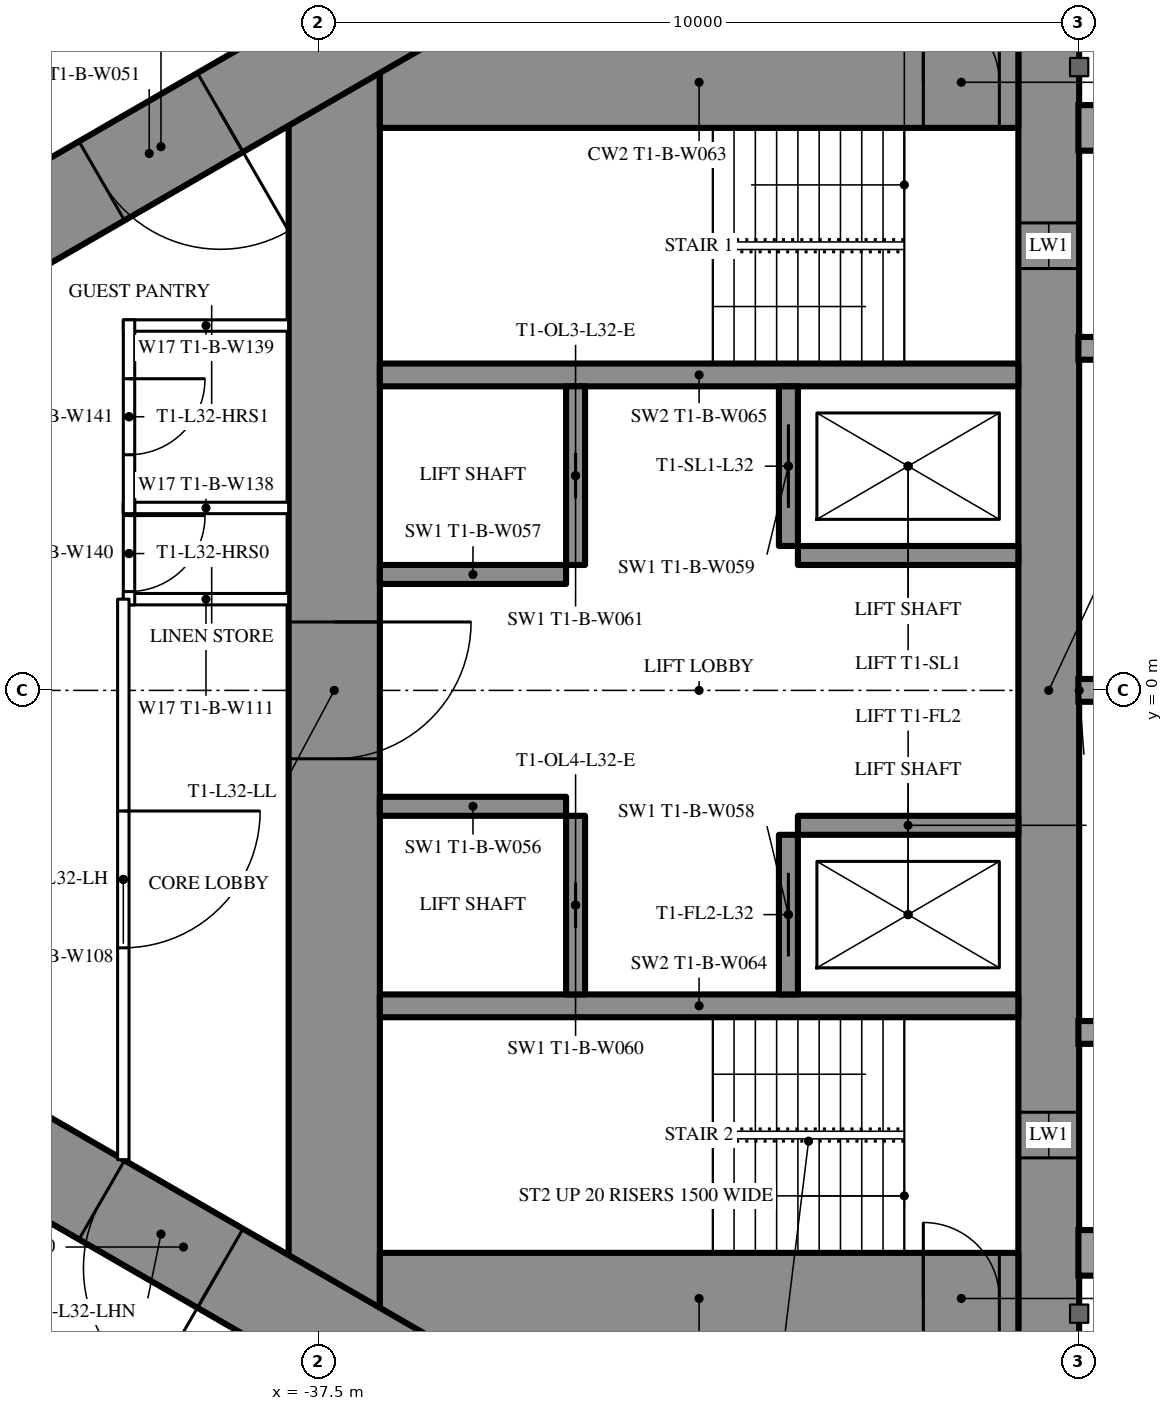
"""IFC4 building model, lengths in metres.
Left out: names, types, materials, properties, quantities, classifications, styles, units other than length and angle.
Written with IfcOpenShell. Run it as: python <this file> out.ifc"""

import sys

from ifc_helpers import new_model, si_unit, direction, frame, frame_2d, origin, place, context, subcontext, project, spatial, rectangle, extrude, element, fill, save


model = new_model("IFC4")
c1 = context("Model", 3, precision=1e-05, world=origin(), true_north=direction((0.0, 1.0)))
c2 = subcontext(c1, "Body", "Model", "MODEL_VIEW")
j1 = project(units=[si_unit("LENGTHUNIT", "METRE"), si_unit("PLANEANGLEUNIT", "RADIAN")], contexts=[c1])
p1 = place(None, origin())
s1 = spatial("IfcSite", under=j1, at=p1, CompositionType="ELEMENT")
p2 = place(p1, origin())
s2 = spatial("IfcBuilding", under=s1, at=p2, CompositionType="ELEMENT")
p3 = place(p2, frame((0.0, 0.0, 122.1)))
s3 = spatial("IfcBuildingStorey", under=s2, at=p3, CompositionType="ELEMENT", Elevation=122.1)
p4 = place(p3, frame((-27.9, 8.6, 0.0), z_axis=(0.0, 0.0, 1.0), x_axis=(0.0, -1.0, 0.0)))
e1 = element("IfcWall", 1, at=p4, inside=s3, PredefinedType="SHEAR", context=c2, shape_type="SweptSolid", body=[
    extrude(rectangle(XDim=17.2, YDim=0.8, at=frame_2d((8.6, 0.0))), origin(), (0.0, 0.0, 1.0), 3.5),
])
p5 = place(p4, frame((2.45, 0.0, 0.6)))
e2 = element("IfcOpeningElement", 2, at=p5, cuts=e1, PredefinedType="OPENING", context=c2, shape_type="SweptSolid", body=[
    extrude(rectangle(XDim=0.6, YDim=2.1, at=frame_2d((0.3, 1.05))), frame((0.0, 0.41, 0.0), z_axis=(0.0, -1.0, 0.0), x_axis=(1.0, 0.0, 0.0)), (0.0, 0.0, 1.0), 0.82),
])
p6 = place(p4, frame((14.15, 0.0, 0.6)))
e3 = element("IfcOpeningElement", 3, at=p6, cuts=e1, PredefinedType="OPENING", context=c2, shape_type="SweptSolid", body=[
    extrude(rectangle(XDim=0.6, YDim=2.1, at=frame_2d((0.3, 1.05))), frame((0.0, 0.41, 0.0), z_axis=(0.0, -1.0, 0.0), x_axis=(1.0, 0.0, 0.0)), (0.0, 0.0, 1.0), 0.82),
])
p7 = place(p3, frame((-37.3, 8.6, 0.0), z_axis=(0.0, 0.0, 1.0), x_axis=(0.0, -1.0, 0.0)))
e4 = element("IfcWall", 4, at=p7, inside=s3, PredefinedType="SHEAR", context=c2, shape_type="SweptSolid", body=[
    extrude(rectangle(XDim=17.2, YDim=1.2, at=frame_2d((8.6, 0.0))), origin(), (0.0, 0.0, 1.0), 3.5),
])
p8 = place(p7, frame((7.7, 0.0, 0.0)))
e5 = element("IfcOpeningElement", 5, at=p8, cuts=e4, PredefinedType="OPENING", context=c2, shape_type="SweptSolid", body=[
    extrude(rectangle(XDim=1.8, YDim=2.2, at=frame_2d((0.9, 1.1))), frame((0.0, 0.61, 0.0), z_axis=(0.0, -1.0, 0.0), x_axis=(1.0, 0.0, 0.0)), (0.0, 0.0, 1.0), 1.22),
])
p9 = place(p3, frame((-28.3, 8.0, 0.0), z_axis=(0.0, 0.0, 1.0), x_axis=(-1.0, 0.0, 0.0)))
e6 = element("IfcWall", 6, at=p9, inside=s3, PredefinedType="SHEAR", context=c2, shape_type="SweptSolid", body=[
    extrude(rectangle(XDim=8.4, YDim=1.2, at=frame_2d((4.2, 0.0))), origin(), (0.0, 0.0, 1.0), 3.5),
])
p10 = place(p9, frame((0.25, 0.0, 0.0)))
e7 = element("IfcOpeningElement", 7, at=p10, cuts=e6, PredefinedType="OPENING", context=c2, shape_type="SweptSolid", body=[
    extrude(rectangle(XDim=1.0, YDim=2.2, at=frame_2d((0.5, 1.1))), frame((0.0, 0.61, 0.0), z_axis=(0.0, -1.0, 0.0), x_axis=(1.0, 0.0, 0.0)), (0.0, 0.0, 1.0), 1.22),
])
p11 = place(p3, frame((-28.3, -8.0, 0.0), z_axis=(0.0, 0.0, 1.0), x_axis=(-1.0, 0.0, 0.0)))
e8 = element("IfcWall", 8, at=p11, inside=s3, PredefinedType="SHEAR", context=c2, shape_type="SweptSolid", body=[
    extrude(rectangle(XDim=8.4, YDim=1.2, at=frame_2d((4.2, 0.0))), origin(), (0.0, 0.0, 1.0), 3.5),
])
p12 = place(p11, frame((0.25, 0.0, 0.0)))
e9 = element("IfcOpeningElement", 9, at=p12, cuts=e8, PredefinedType="OPENING", context=c2, shape_type="SweptSolid", body=[
    extrude(rectangle(XDim=1.0, YDim=2.2, at=frame_2d((0.5, 1.1))), frame((0.0, 0.61, 0.0), z_axis=(0.0, -1.0, 0.0), x_axis=(1.0, 0.0, 0.0)), (0.0, 0.0, 1.0), 1.22),
])
for number, where, z_axis, x_axis in (
    (10, (-28.3, 4.15, 0.0), (0.0, 0.0, 1.0), (-1.0, 0.0, 0.0)),
    (11, (-28.3, -4.15, 0.0), (0.0, 0.0, 1.0), (-1.0, 0.0, 0.0)),
):
    element("IfcWall", number, at=place(p3, frame(where, z_axis=z_axis, x_axis=x_axis)), inside=s3, PredefinedType="SHEAR", context=c2, shape_type="SweptSolid", body=[
        extrude(rectangle(XDim=8.4, YDim=0.3, at=frame_2d((4.2, 0.0))), origin(), (0.0, 0.0, 1.0), 3.5),
    ])
p13 = place(p3, frame((-31.325, 4.0, 0.0), z_axis=(0.0, 0.0, 1.0), x_axis=(0.0, -1.0, 0.0)))
e12 = element("IfcWall", 12, at=p13, inside=s3, PredefinedType="SHEAR", context=c2, shape_type="SweptSolid", body=[
    extrude(rectangle(XDim=2.1, YDim=0.25, at=frame_2d((1.05, 0.0))), origin(), (0.0, 0.0, 1.0), 3.5),
])
p14 = place(p13, frame((0.5, 0.0, 0.0)))
e13 = element("IfcOpeningElement", 13, at=p14, cuts=e12, PredefinedType="OPENING", context=c2, shape_type="SweptSolid", body=[
    extrude(rectangle(XDim=1.1, YDim=2.2, at=frame_2d((0.55, 1.1))), frame((0.0, 0.135, 0.0), z_axis=(0.0, -1.0, 0.0), x_axis=(1.0, 0.0, 0.0)), (0.0, 0.0, 1.0), 0.27),
])
p15 = place(p3, frame((-34.125, 4.0, 0.0), z_axis=(0.0, 0.0, 1.0), x_axis=(0.0, -1.0, 0.0)))
e14 = element("IfcWall", 14, at=p15, inside=s3, PredefinedType="SHEAR", context=c2, shape_type="SweptSolid", body=[
    extrude(rectangle(XDim=2.35, YDim=0.25, at=frame_2d((1.175, 0.0))), origin(), (0.0, 0.0, 1.0), 3.5),
])
p16 = place(p15, frame((0.875, 0.0, 0.0)))
e15 = element("IfcOpeningElement", 15, at=p16, cuts=e14, PredefinedType="OPENING", context=c2, shape_type="SweptSolid", body=[
    extrude(rectangle(XDim=0.6, YDim=2.0, at=frame_2d((0.3, 1.0))), frame((0.0, 0.135, 0.0), z_axis=(0.0, -1.0, 0.0), x_axis=(1.0, 0.0, 0.0)), (0.0, 0.0, 1.0), 0.27),
])
p17 = place(p3, frame((-28.3, 1.775, 0.0), z_axis=(0.0, 0.0, 1.0), x_axis=(-1.0, 0.0, 0.0)))
e16 = element("IfcWall", 16, at=p17, inside=s3, PredefinedType="SHEAR", context=c2, shape_type="SweptSolid", body=[
    extrude(rectangle(XDim=2.9, YDim=0.25, at=frame_2d((1.45, 0.0))), origin(), (0.0, 0.0, 1.0), 3.5),
])
p18 = place(p3, frame((-34.25, 1.525, 0.0), z_axis=(0.0, 0.0, 1.0), x_axis=(-1.0, 0.0, 0.0)))
e17 = element("IfcWall", 17, at=p18, inside=s3, PredefinedType="SHEAR", context=c2, shape_type="SweptSolid", body=[
    extrude(rectangle(XDim=2.45, YDim=0.25, at=frame_2d((1.225, 0.0))), origin(), (0.0, 0.0, 1.0), 3.5),
])
p19 = place(p3, frame((-31.325, -1.9, 0.0), z_axis=(0.0, 0.0, 1.0), x_axis=(0.0, -1.0, 0.0)))
e18 = element("IfcWall", 18, at=p19, inside=s3, PredefinedType="SHEAR", context=c2, shape_type="SweptSolid", body=[
    extrude(rectangle(XDim=2.1, YDim=0.25, at=frame_2d((1.05, 0.0))), origin(), (0.0, 0.0, 1.0), 3.5),
])
p20 = place(p19, frame((0.5, 0.0, 0.0)))
e19 = element("IfcOpeningElement", 19, at=p20, cuts=e18, PredefinedType="OPENING", context=c2, shape_type="SweptSolid", body=[
    extrude(rectangle(XDim=1.1, YDim=2.2, at=frame_2d((0.55, 1.1))), frame((0.0, 0.135, 0.0), z_axis=(0.0, -1.0, 0.0), x_axis=(1.0, 0.0, 0.0)), (0.0, 0.0, 1.0), 0.27),
])
p21 = place(p3, frame((-34.125, -1.65, 0.0), z_axis=(0.0, 0.0, 1.0), x_axis=(0.0, -1.0, 0.0)))
e20 = element("IfcWall", 20, at=p21, inside=s3, PredefinedType="SHEAR", context=c2, shape_type="SweptSolid", body=[
    extrude(rectangle(XDim=2.35, YDim=0.25, at=frame_2d((1.175, 0.0))), origin(), (0.0, 0.0, 1.0), 3.5),
])
p22 = place(p21, frame((0.875, 0.0, 0.0)))
e21 = element("IfcOpeningElement", 21, at=p22, cuts=e20, PredefinedType="OPENING", context=c2, shape_type="SweptSolid", body=[
    extrude(rectangle(XDim=0.6, YDim=2.0, at=frame_2d((0.3, 1.0))), frame((0.0, 0.135, 0.0), z_axis=(0.0, -1.0, 0.0), x_axis=(1.0, 0.0, 0.0)), (0.0, 0.0, 1.0), 0.27),
])
p23 = place(p3, frame((-28.3, -1.775, 0.0), z_axis=(0.0, 0.0, 1.0), x_axis=(-1.0, 0.0, 0.0)))
e22 = element("IfcWall", 22, at=p23, inside=s3, PredefinedType="SHEAR", context=c2, shape_type="SweptSolid", body=[
    extrude(rectangle(XDim=2.9, YDim=0.25, at=frame_2d((1.45, 0.0))), origin(), (0.0, 0.0, 1.0), 3.5),
])
p24 = place(p3, frame((-34.25, -1.525, 0.0), z_axis=(0.0, 0.0, 1.0), x_axis=(-1.0, 0.0, 0.0)))
e23 = element("IfcWall", 23, at=p24, inside=s3, PredefinedType="SHEAR", context=c2, shape_type="SweptSolid", body=[
    extrude(rectangle(XDim=2.45, YDim=0.25, at=frame_2d((1.225, 0.0))), origin(), (0.0, 0.0, 1.0), 3.5),
])
p25 = place(p3, frame((-27.2, 14.3, 0.0), z_axis=(0.0, 0.0, 1.0), x_axis=(-0.866026593062, -0.499997940104, 0.0)))
e24 = element("IfcWall", 24, at=p25, inside=s3, PredefinedType="SHEAR", context=c2, shape_type="SweptSolid", body=[
    extrude(rectangle(XDim=28.946, YDim=1.2, at=frame_2d((14.473, 0.0))), origin(), (0.0, 0.0, 1.0), 3.5),
])
p26 = place(p25, frame((4.6, 0.0, 0.0)))
e25 = element("IfcOpeningElement", 25, at=p26, cuts=e24, PredefinedType="OPENING", context=c2, shape_type="SweptSolid", body=[
    extrude(rectangle(XDim=1.0, YDim=2.2, at=frame_2d((0.5, 1.1))), frame((0.0, 0.61, 0.0), z_axis=(0.0, -1.0, 0.0), x_axis=(1.0, 0.0, 0.0)), (0.0, 0.0, 1.0), 1.22),
])
p27 = place(p25, frame((13.395, 0.0, 0.0)))
e26 = element("IfcOpeningElement", 26, at=p27, cuts=e24, PredefinedType="OPENING", context=c2, shape_type="SweptSolid", body=[
    extrude(rectangle(XDim=1.8, YDim=2.2, at=frame_2d((0.9, 1.1))), frame((0.0, 0.61, 0.0), z_axis=(0.0, -1.0, 0.0), x_axis=(1.0, 0.0, 0.0)), (0.0, 0.0, 1.0), 1.22),
])
p28 = place(p3, frame((-27.2, -14.3, 0.0), z_axis=(0.0, 0.0, 1.0), x_axis=(-0.866024021859, 0.500002393557, 0.0)))
e27 = element("IfcWall", 27, at=p28, inside=s3, PredefinedType="SHEAR", context=c2, shape_type="SweptSolid", body=[
    extrude(rectangle(XDim=27.907, YDim=1.2, at=frame_2d((13.954, 0.0))), origin(), (0.0, 0.0, 1.0), 3.5),
])
p29 = place(p28, frame((4.6, 0.0, 0.0)))
e28 = element("IfcOpeningElement", 28, at=p29, cuts=e27, PredefinedType="OPENING", context=c2, shape_type="SweptSolid", body=[
    extrude(rectangle(XDim=1.0, YDim=2.2, at=frame_2d((0.5, 1.1))), frame((0.0, 0.61, 0.0), z_axis=(0.0, -1.0, 0.0), x_axis=(1.0, 0.0, 0.0)), (0.0, 0.0, 1.0), 1.22),
])
p30 = place(p28, frame((13.395, 0.0, 0.0)))
e29 = element("IfcOpeningElement", 29, at=p30, cuts=e27, PredefinedType="OPENING", context=c2, shape_type="SweptSolid", body=[
    extrude(rectangle(XDim=1.8, YDim=2.2, at=frame_2d((0.9, 1.1))), frame((0.0, 0.61, 0.0), z_axis=(0.0, -1.0, 0.0), x_axis=(1.0, 0.0, 0.0)), (0.0, 0.0, 1.0), 1.22),
])
p31 = place(p3, frame((-36.92, -11.344, 0.0), z_axis=(0.0, 0.0, 1.0), x_axis=(-0.866028313256, 0.499994960614, 0.0)))
e30 = element("IfcWall", 30, at=p31, inside=s3, PredefinedType="PARTITIONING", context=c2, shape_type="SweptSolid", body=[
    extrude(rectangle(XDim=22.568, YDim=0.2, at=frame_2d((11.284, 0.0))), origin(), (0.0, 0.0, 1.0), 3.25),
])
p32 = place(p31, frame((12.131, 0.0, 0.0)))
e31 = element("IfcOpeningElement", 31, at=p32, cuts=e30, PredefinedType="OPENING", context=c2, shape_type="SweptSolid", body=[
    extrude(rectangle(XDim=0.95, YDim=2.2, at=frame_2d((0.475, 1.1))), frame((0.0, 0.11, 0.0), z_axis=(0.0, -1.0, 0.0), x_axis=(1.0, 0.0, 0.0)), (0.0, 0.0, 1.0), 0.22),
])
p33 = place(p31, frame((3.35, 0.0, 0.0)))
e32 = element("IfcOpeningElement", 32, at=p33, cuts=e30, PredefinedType="OPENING", context=c2, shape_type="SweptSolid", body=[
    extrude(rectangle(XDim=1.0, YDim=2.2, at=frame_2d((0.5, 1.1))), frame((0.0, 0.11, 0.0), z_axis=(0.0, -1.0, 0.0), x_axis=(1.0, 0.0, 0.0)), (0.0, 0.0, 1.0), 0.22),
])
p34 = place(p3, frame((-37.7, 10.894, 0.0), z_axis=(0.0, 0.0, 1.0), x_axis=(-0.866027551079, -0.499996280759, 0.0)))
e33 = element("IfcWall", 33, at=p34, inside=s3, PredefinedType="PARTITIONING", context=c2, shape_type="SweptSolid", body=[
    extrude(rectangle(XDim=10.831, YDim=0.2, at=frame_2d((5.415, 0.0))), origin(), (0.0, 0.0, 1.0), 3.25),
])
p35 = place(p34, frame((6.93, 0.0, 0.0)))
e34 = element("IfcOpeningElement", 34, at=p35, cuts=e33, PredefinedType="OPENING", context=c2, shape_type="SweptSolid", body=[
    extrude(rectangle(XDim=0.95, YDim=2.2, at=frame_2d((0.475, 1.1))), frame((0.0, 0.11, 0.0), z_axis=(0.0, -1.0, 0.0), x_axis=(1.0, 0.0, 0.0)), (0.0, 0.0, 1.0), 0.22),
])
for number, where, z_axis, x_axis in (
    (35, (-37.9, 1.2, 0.0), (0.0, 0.0, 1.0), (-1.0, 0.0, 0.0)),
    (36, (-37.9, 2.4, 0.0), (0.0, 0.0, 1.0), (-1.0, 0.0, 0.0)),
    (37, (-37.9, 4.8, 0.0), (0.0, 0.0, 1.0), (-1.0, 0.0, 0.0)),
):
    element("IfcWall", number, at=place(p3, frame(where, z_axis=z_axis, x_axis=x_axis)), inside=s3, PredefinedType="PARTITIONING", context=c2, shape_type="SweptSolid", body=[
        extrude(rectangle(XDim=2.175, YDim=0.15, at=frame_2d((1.087, 0.0))), origin(), (0.0, 0.0, 1.0), 3.25),
    ])
p36 = place(p3, frame((-40.0, 2.475, 0.0), z_axis=(0.0, 0.0, 1.0), x_axis=(0.0, -1.0, 0.0)))
e38 = element("IfcWall", 38, at=p36, inside=s3, PredefinedType="PARTITIONING", context=c2, shape_type="SweptSolid", body=[
    extrude(rectangle(XDim=1.35, YDim=0.15, at=frame_2d((0.675, 0.0))), origin(), (0.0, 0.0, 1.0), 3.25),
])
p37 = place(p36, frame((0.175, 0.0, 0.0)))
e39 = element("IfcOpeningElement", 39, at=p37, cuts=e38, PredefinedType="OPENING", context=c2, shape_type="SweptSolid", body=[
    extrude(rectangle(XDim=1.0, YDim=2.2, at=frame_2d((0.5, 1.1))), frame((0.0, 0.085, 0.0), z_axis=(0.0, -1.0, 0.0), x_axis=(1.0, 0.0, 0.0)), (0.0, 0.0, 1.0), 0.17),
])
p38 = place(p3, frame((-40.0, 4.875, 0.0), z_axis=(0.0, 0.0, 1.0), x_axis=(0.0, -1.0, 0.0)))
e40 = element("IfcWall", 40, at=p38, inside=s3, PredefinedType="PARTITIONING", context=c2, shape_type="SweptSolid", body=[
    extrude(rectangle(XDim=2.55, YDim=0.15, at=frame_2d((1.275, 0.0))), origin(), (0.0, 0.0, 1.0), 3.25),
])
p39 = place(p38, frame((0.775, 0.0, 0.0)))
e41 = element("IfcOpeningElement", 41, at=p39, cuts=e40, PredefinedType="OPENING", context=c2, shape_type="SweptSolid", body=[
    extrude(rectangle(XDim=1.0, YDim=2.2, at=frame_2d((0.5, 1.1))), frame((0.0, 0.085, 0.0), z_axis=(0.0, -1.0, 0.0), x_axis=(1.0, 0.0, 0.0)), (0.0, 0.0, 1.0), 0.17),
])
p40 = place(p3, frame((-40.075, 1.2, 0.0), z_axis=(0.0, 0.0, 1.0), x_axis=(0.0, -1.0, 0.0)))
e42 = element("IfcWall", 42, at=p40, inside=s3, PredefinedType="PARTITIONING", context=c2, shape_type="SweptSolid", body=[
    extrude(rectangle(XDim=7.374, YDim=0.15, at=frame_2d((3.687, 0.0))), origin(), (0.0, 0.0, 1.0), 3.25),
])
p41 = place(p40, frame((2.787, 0.0, 0.0)))
e43 = element("IfcOpeningElement", 43, at=p41, cuts=e42, PredefinedType="OPENING", context=c2, shape_type="SweptSolid", body=[
    extrude(rectangle(XDim=1.8, YDim=2.2, at=frame_2d((0.9, 1.1))), frame((0.0, 0.085, 0.0), z_axis=(0.0, -1.0, 0.0), x_axis=(1.0, 0.0, 0.0)), (0.0, 0.0, 1.0), 0.17),
])
p42 = place(p37, origin())
e44 = element("IfcDoor", 44, at=p42, inside=s3, OperationType="SINGLE_SWING_LEFT", PredefinedType="DOOR", context=c2, shape_type="SweptSolid", body=[
    extrude(rectangle(XDim=1.0, YDim=2.2, at=frame_2d((0.5, 1.1))), frame((0.0, 0.025, 0.0), z_axis=(0.0, -1.0, 0.0), x_axis=(1.0, 0.0, 0.0)), (0.0, 0.0, 1.0), 0.05),
])
fill(e39, e44)
p43 = place(p39, origin())
e45 = element("IfcDoor", 45, at=p43, inside=s3, OperationType="SINGLE_SWING_LEFT", PredefinedType="DOOR", context=c2, shape_type="SweptSolid", body=[
    extrude(rectangle(XDim=1.0, YDim=2.2, at=frame_2d((0.5, 1.1))), frame((0.0, 0.025, 0.0), z_axis=(0.0, -1.0, 0.0), x_axis=(1.0, 0.0, 0.0)), (0.0, 0.0, 1.0), 0.05),
])
fill(e41, e45)
p44 = place(p41, origin())
e46 = element("IfcDoor", 46, at=p44, inside=s3, OperationType="DOUBLE_DOOR_SINGLE_SWING", PredefinedType="DOOR", context=c2, shape_type="SweptSolid", body=[
    extrude(rectangle(XDim=1.8, YDim=2.2, at=frame_2d((0.9, 1.1))), frame((0.0, 0.025, 0.0), z_axis=(0.0, -1.0, 0.0), x_axis=(1.0, 0.0, 0.0)), (0.0, 0.0, 1.0), 0.05),
])
fill(e43, e46)
p45 = place(p27, origin())
e47 = element("IfcDoor", 47, at=p45, inside=s3, OperationType="DOUBLE_DOOR_SINGLE_SWING", PredefinedType="DOOR", context=c2, shape_type="SweptSolid", body=[
    extrude(rectangle(XDim=1.8, YDim=2.2, at=frame_2d((0.9, 1.1))), frame((0.0, 0.025, 0.0), z_axis=(0.0, -1.0, 0.0), x_axis=(1.0, 0.0, 0.0)), (0.0, 0.0, 1.0), 0.05),
])
fill(e26, e47)
p46 = place(p30, origin())
e48 = element("IfcDoor", 48, at=p46, inside=s3, OperationType="DOUBLE_DOOR_SINGLE_SWING", PredefinedType="DOOR", context=c2, shape_type="SweptSolid", body=[
    extrude(rectangle(XDim=1.8, YDim=2.2, at=frame_2d((0.9, 1.1))), frame((0.0, 0.025, 0.0), z_axis=(0.0, -1.0, 0.0), x_axis=(1.0, 0.0, 0.0)), (0.0, 0.0, 1.0), 0.05),
])
fill(e29, e48)
p47 = place(p8, origin())
e49 = element("IfcDoor", 49, at=p47, inside=s3, OperationType="DOUBLE_DOOR_SINGLE_SWING", PredefinedType="DOOR", context=c2, shape_type="SweptSolid", body=[
    extrude(rectangle(XDim=1.8, YDim=2.2, at=frame_2d((0.9, 1.1))), frame((0.0, 0.025, 0.0), z_axis=(0.0, -1.0, 0.0), x_axis=(1.0, 0.0, 0.0)), (0.0, 0.0, 1.0), 0.05),
])
fill(e5, e49)
p48 = place(p10, origin())
e50 = element("IfcDoor", 50, at=p48, inside=s3, OperationType="SINGLE_SWING_RIGHT", PredefinedType="DOOR", context=c2, shape_type="SweptSolid", body=[
    extrude(rectangle(XDim=1.0, YDim=2.2, at=frame_2d((0.5, 1.1))), frame((0.0, 0.025, 0.0), z_axis=(0.0, -1.0, 0.0), x_axis=(1.0, 0.0, 0.0)), (0.0, 0.0, 1.0), 0.05),
])
fill(e7, e50)
p49 = place(p12, origin())
e51 = element("IfcDoor", 51, at=p49, inside=s3, OperationType="SINGLE_SWING_RIGHT", PredefinedType="DOOR", context=c2, shape_type="SweptSolid", body=[
    extrude(rectangle(XDim=1.0, YDim=2.2, at=frame_2d((0.5, 1.1))), frame((0.0, 0.025, 0.0), z_axis=(0.0, -1.0, 0.0), x_axis=(1.0, 0.0, 0.0)), (0.0, 0.0, 1.0), 0.05),
])
fill(e9, e51)
p50 = place(p14, origin())
e52 = element("IfcDoor", 52, at=p50, inside=s3, OperationType="SLIDING_TO_LEFT", PredefinedType="USERDEFINED", context=c2, shape_type="SweptSolid", body=[
    extrude(rectangle(XDim=1.1, YDim=2.2, at=frame_2d((0.55, 1.1))), frame((0.0, 0.025, 0.0), z_axis=(0.0, -1.0, 0.0), x_axis=(1.0, 0.0, 0.0)), (0.0, 0.0, 1.0), 0.05),
])
fill(e13, e52)
p51 = place(p20, origin())
e53 = element("IfcDoor", 53, at=p51, inside=s3, OperationType="SLIDING_TO_LEFT", PredefinedType="USERDEFINED", context=c2, shape_type="SweptSolid", body=[
    extrude(rectangle(XDim=1.1, YDim=2.2, at=frame_2d((0.55, 1.1))), frame((0.0, 0.025, 0.0), z_axis=(0.0, -1.0, 0.0), x_axis=(1.0, 0.0, 0.0)), (0.0, 0.0, 1.0), 0.05),
])
fill(e19, e53)
p52 = place(p16, origin())
e54 = element("IfcDoor", 54, at=p52, inside=s3, OperationType="SLIDING_TO_LEFT", PredefinedType="DOOR", context=c2, shape_type="SweptSolid", body=[
    extrude(rectangle(XDim=0.6, YDim=2.0, at=frame_2d((0.3, 1.0))), frame((0.0, 0.025, 0.0), z_axis=(0.0, -1.0, 0.0), x_axis=(1.0, 0.0, 0.0)), (0.0, 0.0, 1.0), 0.05),
])
fill(e15, e54)
p53 = place(p22, origin())
e55 = element("IfcDoor", 55, at=p53, inside=s3, OperationType="SLIDING_TO_LEFT", PredefinedType="DOOR", context=c2, shape_type="SweptSolid", body=[
    extrude(rectangle(XDim=0.6, YDim=2.0, at=frame_2d((0.3, 1.0))), frame((0.0, 0.025, 0.0), z_axis=(0.0, -1.0, 0.0), x_axis=(1.0, 0.0, 0.0)), (0.0, 0.0, 1.0), 0.05),
])
fill(e21, e55)
p54 = place(p5, origin())
e56 = element("IfcWindow", 56, at=p54, inside=s3, PartitioningType="SINGLE_PANEL", PredefinedType="WINDOW", context=c2, shape_type="SweptSolid", body=[
    extrude(rectangle(XDim=0.6, YDim=2.1, at=frame_2d((0.3, 1.05))), frame((0.0, 0.03, 0.0), z_axis=(0.0, -1.0, 0.0), x_axis=(1.0, 0.0, 0.0)), (0.0, 0.0, 1.0), 0.06),
])
fill(e2, e56)
p55 = place(p6, origin())
e57 = element("IfcWindow", 57, at=p55, inside=s3, PartitioningType="SINGLE_PANEL", PredefinedType="WINDOW", context=c2, shape_type="SweptSolid", body=[
    extrude(rectangle(XDim=0.6, YDim=2.1, at=frame_2d((0.3, 1.05))), frame((0.0, 0.03, 0.0), z_axis=(0.0, -1.0, 0.0), x_axis=(1.0, 0.0, 0.0)), (0.0, 0.0, 1.0), 0.06),
])
fill(e3, e57)
save(model, sys.argv[1])
